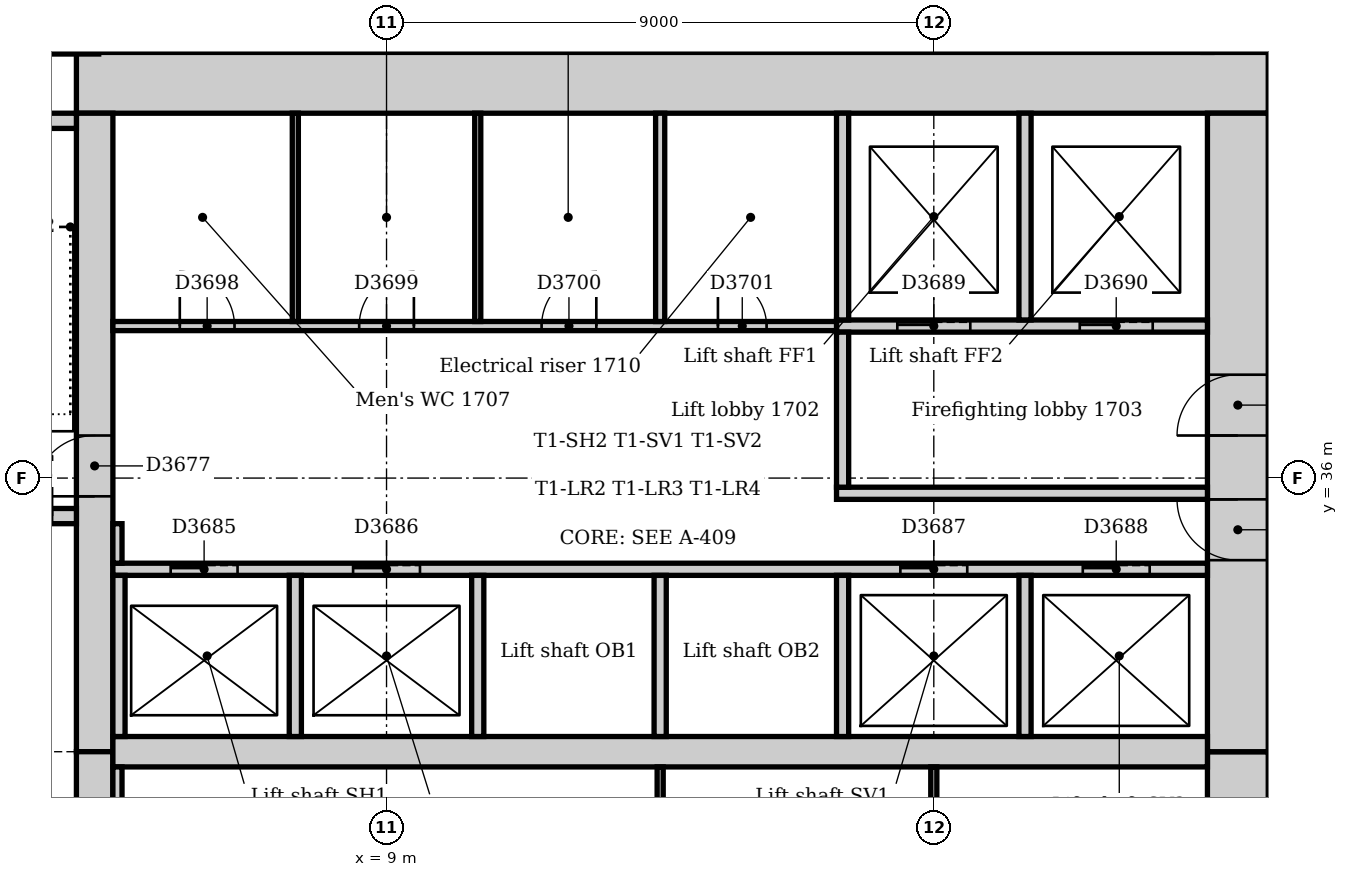
"""IFC4 building model, lengths in metres.
Left out: names, types, materials, properties, quantities, classifications, styles, units other than length and angle.
Written with IfcOpenShell. Run it as: python <this file> out.ifc"""

import sys

from ifc_helpers import new_model, si_unit, direction, frame, frame_2d, origin, origin_2d, place, context, subcontext, project, spatial, rectangle, extrude, element, fill, save


model = new_model("IFC4")
c1 = context("Model", 3, precision=1e-05, world=origin(), true_north=direction((0.0, 1.0)))
c2 = subcontext(c1, "Body", "Model", "MODEL_VIEW")
j1 = project(units=[si_unit("LENGTHUNIT", "METRE"), si_unit("PLANEANGLEUNIT", "RADIAN")], contexts=[c1])
p1 = place(None, origin())
s1 = spatial("IfcSite", under=j1, at=p1, CompositionType="ELEMENT")
p2 = place(p1, origin())
s2 = spatial("IfcBuilding", under=s1, at=p2, CompositionType="ELEMENT")
p3 = place(p2, frame((0.0, 0.0, 75.0)))
s3 = spatial("IfcBuildingStorey", under=s2, at=p3, CompositionType="ELEMENT", Elevation=75.0)
p4 = place(p3, frame((23.5, 42.5, 0.0), z_axis=(0.0, 0.0, 1.0), x_axis=(-1.0, 0.0, 0.0)))
e1 = element("IfcWall", 1, at=p4, inside=s3, PredefinedType="SOLIDWALL", context=c2, shape_type="SweptSolid", body=[
    extrude(rectangle(XDim=19.6, YDim=1.0, at=frame_2d((9.8, 0.0))), origin(), (0.0, 0.0, 1.0), 4.0),
])
p5 = place(p3, frame((23.0, 21.0, 0.0), z_axis=(0.0, 0.0, 1.0), x_axis=(0.0, 1.0, 0.0)))
e2 = element("IfcWall", 2, at=p5, inside=s3, PredefinedType="SOLIDWALL", context=c2, shape_type="SweptSolid", body=[
    extrude(rectangle(XDim=10.5, YDim=1.0, at=frame_2d((5.25, 0.0))), origin(), (0.0, 0.0, 1.0), 4.0),
])
p6 = place(p5, frame((4.35, 0.0, 0.0)))
e3 = element("IfcOpeningElement", 3, at=p6, cuts=e2, PredefinedType="OPENING", context=c2, shape_type="SweptSolid", body=[
    extrude(rectangle(XDim=1.8, YDim=2.1, at=frame_2d((0.9, 1.05))), frame((0.0, 0.51, 0.0), z_axis=(0.0, -1.0, 0.0), x_axis=(1.0, 0.0, 0.0)), (0.0, 0.0, 1.0), 1.02),
])
p7 = place(p3, frame((23.0, 31.5, 0.0), z_axis=(0.0, 0.0, 1.0), x_axis=(0.0, 1.0, 0.0)))
e4 = element("IfcWall", 4, at=p7, inside=s3, PredefinedType="SOLIDWALL", context=c2, shape_type="SweptSolid", body=[
    extrude(rectangle(XDim=10.5, YDim=1.0, at=frame_2d((5.25, 0.0))), origin(), (0.0, 0.0, 1.0), 4.0),
])
p8 = place(p7, frame((3.15, 0.0, 0.0)))
e5 = element("IfcOpeningElement", 5, at=p8, cuts=e4, PredefinedType="OPENING", context=c2, shape_type="SweptSolid", body=[
    extrude(rectangle(XDim=1.0, YDim=2.1, at=frame_2d((0.5, 1.05))), frame((0.0, 0.51, 0.0), z_axis=(0.0, -1.0, 0.0), x_axis=(1.0, 0.0, 0.0)), (0.0, 0.0, 1.0), 1.02),
])
p9 = place(p7, frame((5.2, 0.0, 0.0)))
e6 = element("IfcOpeningElement", 6, at=p9, cuts=e4, PredefinedType="OPENING", context=c2, shape_type="SweptSolid", body=[
    extrude(rectangle(XDim=1.0, YDim=2.1, at=frame_2d((0.5, 1.05))), frame((0.0, 0.51, 0.0), z_axis=(0.0, -1.0, 0.0), x_axis=(1.0, 0.0, 0.0)), (0.0, 0.0, 1.0), 1.02),
])
p10 = place(p3, frame((4.2, 42.0, 0.0), z_axis=(0.0, 0.0, 1.0), x_axis=(0.0, -1.0, 0.0)))
e7 = element("IfcWall", 7, at=p10, inside=s3, PredefinedType="SOLIDWALL", context=c2, shape_type="SweptSolid", body=[
    extrude(rectangle(XDim=10.5, YDim=0.6, at=frame_2d((5.25, 0.0))), origin(), (0.0, 0.0, 1.0), 4.0),
])
p11 = place(p10, frame((5.3, 0.0, 0.0)))
e8 = element("IfcOpeningElement", 8, at=p11, cuts=e7, PredefinedType="OPENING", context=c2, shape_type="SweptSolid", body=[
    extrude(rectangle(XDim=1.0, YDim=2.1, at=frame_2d((0.5, 1.05))), frame((0.0, 0.31, 0.0), z_axis=(0.0, -1.0, 0.0), x_axis=(1.0, 0.0, 0.0)), (0.0, 0.0, 1.0), 0.62),
])
p12 = place(p3, frame((4.2, 31.5, 0.0), z_axis=(0.0, 0.0, 1.0), x_axis=(0.0, -1.0, 0.0)))
e9 = element("IfcWall", 9, at=p12, inside=s3, PredefinedType="SOLIDWALL", context=c2, shape_type="SweptSolid", body=[
    extrude(rectangle(XDim=10.5, YDim=0.6, at=frame_2d((5.25, 0.0))), origin(), (0.0, 0.0, 1.0), 4.0),
])
p13 = place(p12, frame((4.25, 0.0, 0.0)))
e10 = element("IfcOpeningElement", 10, at=p13, cuts=e9, PredefinedType="OPENING", context=c2, shape_type="SweptSolid", body=[
    extrude(rectangle(XDim=1.0, YDim=2.1, at=frame_2d((0.5, 1.05))), frame((0.0, 0.31, 0.0), z_axis=(0.0, -1.0, 0.0), x_axis=(1.0, 0.0, 0.0)), (0.0, 0.0, 1.0), 0.62),
])
p14 = place(p3, frame((4.5, 31.5, 0.0), z_axis=(0.0, 0.0, 1.0), x_axis=(1.0, 0.0, 0.0)))
e11 = element("IfcWall", 11, at=p14, inside=s3, PredefinedType="SOLIDWALL", context=c2, shape_type="SweptSolid", body=[
    extrude(rectangle(XDim=18.0, YDim=0.5, at=frame_2d((9.0, 0.0))), origin(), (0.0, 0.0, 1.0), 4.0),
])
p15 = place(p3, frame((0.36, 35.375, 0.0), z_axis=(0.0, 0.0, 1.0), x_axis=(1.0, 0.0, 0.0)))
e12 = element("IfcWall", 12, at=p15, inside=s3, PredefinedType="SOLIDWALL", context=c2, shape_type="SweptSolid", body=[
    extrude(rectangle(XDim=3.54, YDim=0.25, at=frame_2d((1.77, 0.0))), origin(), (0.0, 0.0, 1.0), 4.0),
])
p16 = place(p15, frame((2.14, 0.0, 0.0)))
e13 = element("IfcOpeningElement", 13, at=p16, cuts=e12, PredefinedType="OPENING", context=c2, shape_type="SweptSolid", body=[
    extrude(rectangle(XDim=1.0, YDim=2.1, at=frame_2d((0.5, 1.05))), frame((0.0, 0.135, 0.0), z_axis=(0.0, -1.0, 0.0), x_axis=(1.0, 0.0, 0.0)), (0.0, 0.0, 1.0), 0.27),
])
p17 = place(p3, frame((3.9, 41.875, 0.0), z_axis=(0.0, 0.0, 1.0), x_axis=(-1.0, 0.0, 0.0)))
e14 = element("IfcWall", 14, at=p17, inside=s3, PredefinedType="SOLIDWALL", context=c2, shape_type="SweptSolid", body=[
    extrude(rectangle(XDim=3.54, YDim=0.25, at=frame_2d((1.77, 0.0))), origin(), (0.0, 0.0, 1.0), 4.0),
])
p18 = place(p3, frame((3.667, 43.574, 0.0), z_axis=(0.0, 0.0, 1.0), x_axis=(1.0, 0.0, 0.0)))
e15 = element("IfcColumn", 15, at=p18, inside=s3, PredefinedType="COLUMN", context=c2, shape_type="SweptSolid", body=[
    extrude(rectangle(XDim=1.2, YDim=1.2, at=origin_2d()), origin(), (0.0, 0.0, 1.0), 3.85),
])
p19 = place(p3, frame((16.4, 35.75, 0.0), z_axis=(0.0, 0.0, 1.0), x_axis=(1.0, 0.0, 0.0)))
e16 = element("IfcWall", 16, at=p19, inside=s3, PredefinedType="PARTITIONING", context=c2, shape_type="SweptSolid", body=[
    extrude(rectangle(XDim=6.1, YDim=0.2, at=frame_2d((3.05, 0.0))), origin(), (0.0, 0.0, 1.0), 3.85),
])
p20 = place(p3, frame((16.4, 38.5, 0.0), z_axis=(0.0, 0.0, 1.0), x_axis=(1.0, 0.0, 0.0)))
e17 = element("IfcWall", 17, at=p20, inside=s3, PredefinedType="PARTITIONING", context=c2, shape_type="SweptSolid", body=[
    extrude(rectangle(XDim=6.1, YDim=0.2, at=frame_2d((3.05, 0.0))), origin(), (0.0, 0.0, 1.0), 3.85),
])
p21 = place(p20, frame((1.0, 0.0, 0.0)))
e18 = element("IfcOpeningElement", 18, at=p21, cuts=e17, PredefinedType="OPENING", context=c2, shape_type="SweptSolid", body=[
    extrude(rectangle(XDim=1.2, YDim=2.1, at=frame_2d((0.6, 1.05))), frame((0.0, 0.11, 0.0), z_axis=(0.0, -1.0, 0.0), x_axis=(1.0, 0.0, 0.0)), (0.0, 0.0, 1.0), 0.22),
])
p22 = place(p20, frame((4.0, 0.0, 0.0)))
e19 = element("IfcOpeningElement", 19, at=p22, cuts=e17, PredefinedType="OPENING", context=c2, shape_type="SweptSolid", body=[
    extrude(rectangle(XDim=1.2, YDim=2.1, at=frame_2d((0.6, 1.05))), frame((0.0, 0.11, 0.0), z_axis=(0.0, -1.0, 0.0), x_axis=(1.0, 0.0, 0.0)), (0.0, 0.0, 1.0), 0.22),
])
p23 = place(p3, frame((16.5, 35.85, 0.0), z_axis=(0.0, 0.0, 1.0), x_axis=(0.0, 1.0, 0.0)))
e20 = element("IfcWall", 20, at=p23, inside=s3, PredefinedType="PARTITIONING", context=c2, shape_type="SweptSolid", body=[
    extrude(rectangle(XDim=2.55, YDim=0.2, at=frame_2d((1.275, 0.0))), origin(), (0.0, 0.0, 1.0), 3.85),
])
p24 = place(p3, frame((4.5, 34.5, 0.0), z_axis=(0.0, 0.0, 1.0), x_axis=(1.0, 0.0, 0.0)))
e21 = element("IfcWall", 21, at=p24, inside=s3, PredefinedType="PARTITIONING", context=c2, shape_type="SweptSolid", body=[
    extrude(rectangle(XDim=18.0, YDim=0.2, at=frame_2d((9.0, 0.0))), origin(), (0.0, 0.0, 1.0), 3.85),
])
p25 = place(p24, frame((0.95, 0.0, 0.0)))
e22 = element("IfcOpeningElement", 22, at=p25, cuts=e21, PredefinedType="OPENING", context=c2, shape_type="SweptSolid", body=[
    extrude(rectangle(XDim=1.1, YDim=2.1, at=frame_2d((0.55, 1.05))), frame((0.0, 0.11, 0.0), z_axis=(0.0, -1.0, 0.0), x_axis=(1.0, 0.0, 0.0)), (0.0, 0.0, 1.0), 0.22),
])
p26 = place(p24, frame((3.95, 0.0, 0.0)))
e23 = element("IfcOpeningElement", 23, at=p26, cuts=e21, PredefinedType="OPENING", context=c2, shape_type="SweptSolid", body=[
    extrude(rectangle(XDim=1.1, YDim=2.1, at=frame_2d((0.55, 1.05))), frame((0.0, 0.11, 0.0), z_axis=(0.0, -1.0, 0.0), x_axis=(1.0, 0.0, 0.0)), (0.0, 0.0, 1.0), 0.22),
])
p27 = place(p24, frame((12.95, 0.0, 0.0)))
e24 = element("IfcOpeningElement", 24, at=p27, cuts=e21, PredefinedType="OPENING", context=c2, shape_type="SweptSolid", body=[
    extrude(rectangle(XDim=1.1, YDim=2.1, at=frame_2d((0.55, 1.05))), frame((0.0, 0.11, 0.0), z_axis=(0.0, -1.0, 0.0), x_axis=(1.0, 0.0, 0.0)), (0.0, 0.0, 1.0), 0.22),
])
p28 = place(p24, frame((15.95, 0.0, 0.0)))
e25 = element("IfcOpeningElement", 25, at=p28, cuts=e21, PredefinedType="OPENING", context=c2, shape_type="SweptSolid", body=[
    extrude(rectangle(XDim=1.1, YDim=2.1, at=frame_2d((0.55, 1.05))), frame((0.0, 0.11, 0.0), z_axis=(0.0, -1.0, 0.0), x_axis=(1.0, 0.0, 0.0)), (0.0, 0.0, 1.0), 0.22),
])
for number, where, z_axis, x_axis in (
    (26, (16.5, 38.6, 0.0), (0.0, 0.0, 1.0), (0.0, 1.0, 0.0)),
    (27, (19.5, 38.6, 0.0), (0.0, 0.0, 1.0), (0.0, 1.0, 0.0)),
):
    element("IfcWall", number, at=place(p3, frame(where, z_axis=z_axis, x_axis=x_axis)), inside=s3, PredefinedType="PARTITIONING", context=c2, shape_type="SweptSolid", body=[
        extrude(rectangle(XDim=3.4, YDim=0.2, at=frame_2d((1.7, 0.0))), origin(), (0.0, 0.0, 1.0), 3.85),
    ])
for number, where, z_axis, x_axis in (
    (28, (4.6, 31.75, 0.0), (0.0, 0.0, 1.0), (0.0, 1.0, 0.0)),
    (29, (7.5, 31.75, 0.0), (0.0, 0.0, 1.0), (0.0, 1.0, 0.0)),
    (30, (10.5, 31.75, 0.0), (0.0, 0.0, 1.0), (0.0, 1.0, 0.0)),
    (31, (13.5, 31.75, 0.0), (0.0, 0.0, 1.0), (0.0, 1.0, 0.0)),
    (32, (16.5, 31.75, 0.0), (0.0, 0.0, 1.0), (0.0, 1.0, 0.0)),
    (33, (19.5, 31.75, 0.0), (0.0, 0.0, 1.0), (0.0, 1.0, 0.0)),
):
    element("IfcWall", number, at=place(p3, frame(where, z_axis=z_axis, x_axis=x_axis)), inside=s3, PredefinedType="PARTITIONING", context=c2, shape_type="SweptSolid", body=[
        extrude(rectangle(XDim=2.65, YDim=0.2, at=frame_2d((1.325, 0.0))), origin(), (0.0, 0.0, 1.0), 3.85),
    ])
p29 = place(p3, frame((4.5, 38.5, 0.0), z_axis=(0.0, 0.0, 1.0), x_axis=(1.0, 0.0, 0.0)))
e34 = element("IfcWall", 34, at=p29, inside=s3, PredefinedType="PARTITIONING", context=c2, shape_type="SweptSolid", body=[
    extrude(rectangle(XDim=11.9, YDim=0.15, at=frame_2d((5.95, 0.0))), origin(), (0.0, 0.0, 1.0), 3.85),
])
p30 = place(p29, frame((1.1, 0.0, 0.0)))
e35 = element("IfcOpeningElement", 35, at=p30, cuts=e34, PredefinedType="OPENING", context=c2, shape_type="SweptSolid", body=[
    extrude(rectangle(XDim=0.9, YDim=2.1, at=frame_2d((0.45, 1.05))), frame((0.0, 0.085, 0.0), z_axis=(0.0, -1.0, 0.0), x_axis=(1.0, 0.0, 0.0)), (0.0, 0.0, 1.0), 0.17),
])
p31 = place(p29, frame((4.05, 0.0, 0.0)))
e36 = element("IfcOpeningElement", 36, at=p31, cuts=e34, PredefinedType="OPENING", context=c2, shape_type="SweptSolid", body=[
    extrude(rectangle(XDim=0.9, YDim=2.1, at=frame_2d((0.45, 1.05))), frame((0.0, 0.085, 0.0), z_axis=(0.0, -1.0, 0.0), x_axis=(1.0, 0.0, 0.0)), (0.0, 0.0, 1.0), 0.17),
])
p32 = place(p29, frame((7.05, 0.0, 0.0)))
e37 = element("IfcOpeningElement", 37, at=p32, cuts=e34, PredefinedType="OPENING", context=c2, shape_type="SweptSolid", body=[
    extrude(rectangle(XDim=0.9, YDim=2.1, at=frame_2d((0.45, 1.05))), frame((0.0, 0.085, 0.0), z_axis=(0.0, -1.0, 0.0), x_axis=(1.0, 0.0, 0.0)), (0.0, 0.0, 1.0), 0.17),
])
p33 = place(p29, frame((9.95, 0.0, 0.0)))
e38 = element("IfcOpeningElement", 38, at=p33, cuts=e34, PredefinedType="OPENING", context=c2, shape_type="SweptSolid", body=[
    extrude(rectangle(XDim=0.8, YDim=2.1, at=frame_2d((0.4, 1.05))), frame((0.0, 0.085, 0.0), z_axis=(0.0, -1.0, 0.0), x_axis=(1.0, 0.0, 0.0)), (0.0, 0.0, 1.0), 0.17),
])
p34 = place(p3, frame((4.575, 28.575, 0.0), z_axis=(0.0, 0.0, 1.0), x_axis=(0.0, 1.0, 0.0)))
e39 = element("IfcWall", 39, at=p34, inside=s3, PredefinedType="PARTITIONING", context=c2, shape_type="SweptSolid", body=[
    extrude(rectangle(XDim=2.675, YDim=0.15, at=frame_2d((1.337, 0.0))), origin(), (0.0, 0.0, 1.0), 3.85),
])
p35 = place(p3, frame((4.575, 34.6, 0.0), z_axis=(0.0, 0.0, 1.0), x_axis=(0.0, 1.0, 0.0)))
e40 = element("IfcWall", 40, at=p35, inside=s3, PredefinedType="PARTITIONING", context=c2, shape_type="SweptSolid", body=[
    extrude(rectangle(XDim=0.65, YDim=0.15, at=frame_2d((0.325, 0.0))), origin(), (0.0, 0.0, 1.0), 3.85),
])
p36 = place(p3, frame((13.5, 38.575, 0.0), z_axis=(0.0, 0.0, 1.0), x_axis=(0.0, 1.0, 0.0)))
e41 = element("IfcWall", 41, at=p36, inside=s3, PredefinedType="PARTITIONING", context=c2, shape_type="SweptSolid", body=[
    extrude(rectangle(XDim=3.425, YDim=0.15, at=frame_2d((1.712, 0.0))), origin(), (0.0, 0.0, 1.0), 3.85),
])
for number, where, z_axis, x_axis in (
    (42, (7.5, 38.575, 0.0), (0.0, 0.0, 1.0), (0.0, 1.0, 0.0)),
    (43, (10.5, 38.575, 0.0), (0.0, 0.0, 1.0), (0.0, 1.0, 0.0)),
):
    element("IfcWall", number, at=place(p3, frame(where, z_axis=z_axis, x_axis=x_axis)), inside=s3, PredefinedType="PARTITIONING", context=c2, shape_type="SweptSolid", body=[
        extrude(rectangle(XDim=3.425, YDim=0.1, at=frame_2d((1.712, 0.0))), origin(), (0.0, 0.0, 1.0), 3.85),
    ])
for number, where, z_axis, x_axis in (
    (44, (13.5, 28.575, 0.0), (0.0, 0.0, 1.0), (0.0, 1.0, 0.0)),
    (45, (18.0, 28.575, 0.0), (0.0, 0.0, 1.0), (0.0, 1.0, 0.0)),
):
    element("IfcWall", number, at=place(p3, frame(where, z_axis=z_axis, x_axis=x_axis)), inside=s3, PredefinedType="PARTITIONING", context=c2, shape_type="SweptSolid", body=[
        extrude(rectangle(XDim=2.675, YDim=0.1, at=frame_2d((1.337, 0.0))), origin(), (0.0, 0.0, 1.0), 3.85),
    ])
p37 = place(p11, frame((1.0, 0.0, 0.0), z_axis=(0.0, 0.0, 1.0), x_axis=(-1.0, 0.0, 0.0)))
e46 = element("IfcDoor", 46, at=p37, inside=s3, OperationType="SINGLE_SWING_LEFT", PredefinedType="DOOR", context=c2, shape_type="SweptSolid", body=[
    extrude(rectangle(XDim=1.0, YDim=2.1, at=frame_2d((0.5, 1.05))), frame((0.0, 0.025, 0.0), z_axis=(0.0, -1.0, 0.0), x_axis=(1.0, 0.0, 0.0)), (0.0, 0.0, 1.0), 0.05),
])
fill(e8, e46)
p38 = place(p25, origin())
e47 = element("IfcDoor", 47, at=p38, inside=s3, OperationType="SLIDING_TO_LEFT", PredefinedType="DOOR", context=c2, shape_type="SweptSolid", body=[
    extrude(rectangle(XDim=1.1, YDim=2.1, at=frame_2d((0.55, 1.05))), frame((0.0, 0.025, 0.0), z_axis=(0.0, -1.0, 0.0), x_axis=(1.0, 0.0, 0.0)), (0.0, 0.0, 1.0), 0.05),
])
fill(e22, e47)
p39 = place(p26, origin())
e48 = element("IfcDoor", 48, at=p39, inside=s3, OperationType="SLIDING_TO_LEFT", PredefinedType="DOOR", context=c2, shape_type="SweptSolid", body=[
    extrude(rectangle(XDim=1.1, YDim=2.1, at=frame_2d((0.55, 1.05))), frame((0.0, 0.025, 0.0), z_axis=(0.0, -1.0, 0.0), x_axis=(1.0, 0.0, 0.0)), (0.0, 0.0, 1.0), 0.05),
])
fill(e23, e48)
p40 = place(p27, origin())
e49 = element("IfcDoor", 49, at=p40, inside=s3, OperationType="SLIDING_TO_LEFT", PredefinedType="DOOR", context=c2, shape_type="SweptSolid", body=[
    extrude(rectangle(XDim=1.1, YDim=2.1, at=frame_2d((0.55, 1.05))), frame((0.0, 0.025, 0.0), z_axis=(0.0, -1.0, 0.0), x_axis=(1.0, 0.0, 0.0)), (0.0, 0.0, 1.0), 0.05),
])
fill(e24, e49)
p41 = place(p28, origin())
e50 = element("IfcDoor", 50, at=p41, inside=s3, OperationType="SLIDING_TO_LEFT", PredefinedType="DOOR", context=c2, shape_type="SweptSolid", body=[
    extrude(rectangle(XDim=1.1, YDim=2.1, at=frame_2d((0.55, 1.05))), frame((0.0, 0.025, 0.0), z_axis=(0.0, -1.0, 0.0), x_axis=(1.0, 0.0, 0.0)), (0.0, 0.0, 1.0), 0.05),
])
fill(e25, e50)
p42 = place(p21, origin())
e51 = element("IfcDoor", 51, at=p42, inside=s3, OperationType="SLIDING_TO_LEFT", PredefinedType="DOOR", context=c2, shape_type="SweptSolid", body=[
    extrude(rectangle(XDim=1.2, YDim=2.1, at=frame_2d((0.6, 1.05))), frame((0.0, 0.025, 0.0), z_axis=(0.0, -1.0, 0.0), x_axis=(1.0, 0.0, 0.0)), (0.0, 0.0, 1.0), 0.05),
])
fill(e18, e51)
p43 = place(p22, origin())
e52 = element("IfcDoor", 52, at=p43, inside=s3, OperationType="SLIDING_TO_LEFT", PredefinedType="DOOR", context=c2, shape_type="SweptSolid", body=[
    extrude(rectangle(XDim=1.2, YDim=2.1, at=frame_2d((0.6, 1.05))), frame((0.0, 0.025, 0.0), z_axis=(0.0, -1.0, 0.0), x_axis=(1.0, 0.0, 0.0)), (0.0, 0.0, 1.0), 0.05),
])
fill(e19, e52)
p44 = place(p8, origin())
e53 = element("IfcDoor", 53, at=p44, inside=s3, OperationType="SINGLE_SWING_RIGHT", PredefinedType="DOOR", context=c2, shape_type="SweptSolid", body=[
    extrude(rectangle(XDim=1.0, YDim=2.1, at=frame_2d((0.5, 1.05))), frame((0.0, 0.025, 0.0), z_axis=(0.0, -1.0, 0.0), x_axis=(1.0, 0.0, 0.0)), (0.0, 0.0, 1.0), 0.05),
])
fill(e5, e53)
p45 = place(p9, origin())
e54 = element("IfcDoor", 54, at=p45, inside=s3, OperationType="SINGLE_SWING_LEFT", PredefinedType="DOOR", context=c2, shape_type="SweptSolid", body=[
    extrude(rectangle(XDim=1.0, YDim=2.1, at=frame_2d((0.5, 1.05))), frame((0.0, 0.025, 0.0), z_axis=(0.0, -1.0, 0.0), x_axis=(1.0, 0.0, 0.0)), (0.0, 0.0, 1.0), 0.05),
])
fill(e6, e54)
p46 = place(p30, origin())
e55 = element("IfcDoor", 55, at=p46, inside=s3, OperationType="SINGLE_SWING_LEFT", PredefinedType="DOOR", context=c2, shape_type="SweptSolid", body=[
    extrude(rectangle(XDim=0.9, YDim=2.1, at=frame_2d((0.45, 1.05))), frame((0.0, 0.025, 0.0), z_axis=(0.0, -1.0, 0.0), x_axis=(1.0, 0.0, 0.0)), (0.0, 0.0, 1.0), 0.05),
])
fill(e35, e55)
p47 = place(p31, origin())
e56 = element("IfcDoor", 56, at=p47, inside=s3, OperationType="SINGLE_SWING_RIGHT", PredefinedType="DOOR", context=c2, shape_type="SweptSolid", body=[
    extrude(rectangle(XDim=0.9, YDim=2.1, at=frame_2d((0.45, 1.05))), frame((0.0, 0.025, 0.0), z_axis=(0.0, -1.0, 0.0), x_axis=(1.0, 0.0, 0.0)), (0.0, 0.0, 1.0), 0.05),
])
fill(e36, e56)
p48 = place(p32, origin())
e57 = element("IfcDoor", 57, at=p48, inside=s3, OperationType="SINGLE_SWING_RIGHT", PredefinedType="DOOR", context=c2, shape_type="SweptSolid", body=[
    extrude(rectangle(XDim=0.9, YDim=2.1, at=frame_2d((0.45, 1.05))), frame((0.0, 0.025, 0.0), z_axis=(0.0, -1.0, 0.0), x_axis=(1.0, 0.0, 0.0)), (0.0, 0.0, 1.0), 0.05),
])
fill(e37, e57)
p49 = place(p33, origin())
e58 = element("IfcDoor", 58, at=p49, inside=s3, OperationType="SINGLE_SWING_LEFT", PredefinedType="DOOR", context=c2, shape_type="SweptSolid", body=[
    extrude(rectangle(XDim=0.8, YDim=2.1, at=frame_2d((0.4, 1.05))), frame((0.0, 0.025, 0.0), z_axis=(0.0, -1.0, 0.0), x_axis=(1.0, 0.0, 0.0)), (0.0, 0.0, 1.0), 0.05),
])
fill(e38, e58)
save(model, sys.argv[1])
